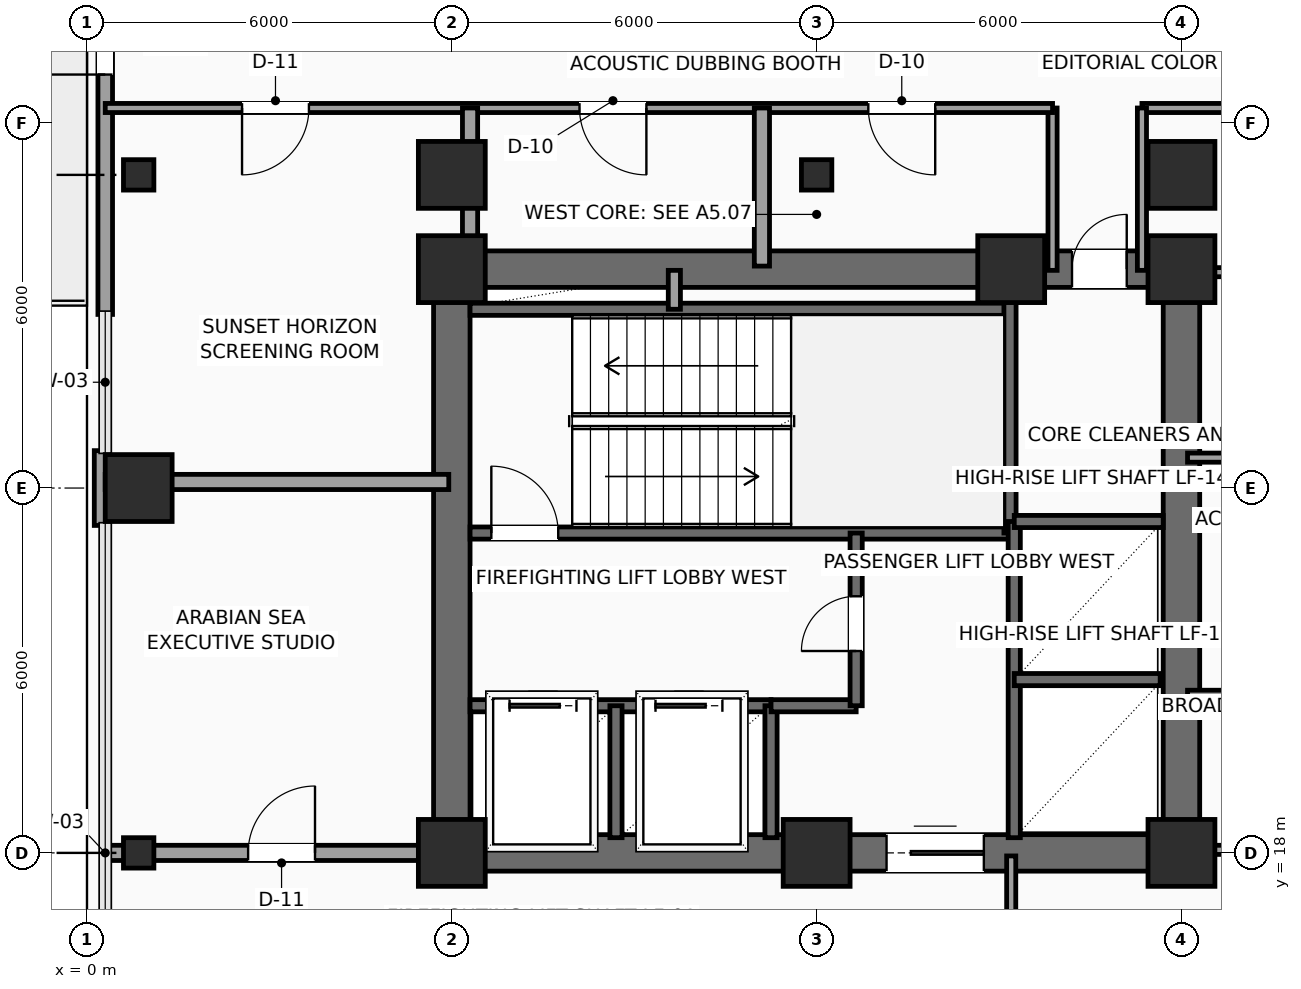
"""IFC4 building model, lengths in metres.
Left out: names, types, materials, properties, quantities, classifications, styles, units other than length and angle.
Written with IfcOpenShell. Run it as: python <this file> out.ifc"""

import sys

from ifc_helpers import new_model, si_unit, direction, frame, frame_2d, origin, origin_2d, place, context, subcontext, project, spatial, rectangle, hollow_rectangle, extrude, element, fill, save


model = new_model("IFC4")
c1 = context("Model", 3, precision=1e-05, world=origin(), true_north=direction((0.0, 1.0)))
c2 = subcontext(c1, "Body", "Model", "MODEL_VIEW")
j1 = project(units=[si_unit("LENGTHUNIT", "METRE"), si_unit("PLANEANGLEUNIT", "RADIAN")], contexts=[c1])
p1 = place(None, origin())
s1 = spatial("IfcSite", under=j1, at=p1, CompositionType="ELEMENT")
p2 = place(p1, origin())
s2 = spatial("IfcBuilding", under=s1, at=p2, CompositionType="ELEMENT")
p3 = place(p2, frame((0.0, 0.0, 134.4)))
s3 = spatial("IfcBuildingStorey", under=s2, at=p3, CompositionType="ELEMENT", Elevation=134.4)
for number, where, z_axis, x_axis in (
    (1, (6.0, 18.0, 0.0), (0.0, 0.0, 1.0), (1.0, 0.0, 0.0)),
    (2, (12.0, 18.0, 0.0), (0.0, 0.0, 1.0), (1.0, 0.0, 0.0)),
    (3, (18.0, 18.0, 0.0), (0.0, 0.0, 1.0), (1.0, 0.0, 0.0)),
    (4, (6.0, 27.6, 0.0), (0.0, 0.0, 1.0), (1.0, 0.0, 0.0)),
    (5, (15.2, 27.6, 0.0), (0.0, 0.0, 1.0), (1.0, 0.0, 0.0)),
    (6, (18.0, 27.6, 0.0), (0.0, 0.0, 1.0), (1.0, 0.0, 0.0)),
):
    element("IfcColumn", number, at=place(p3, frame(where, z_axis=z_axis, x_axis=x_axis)), inside=s3, PredefinedType="COLUMN", context=c2, shape_type="SweptSolid", body=[
        extrude(rectangle(XDim=1.1, YDim=1.1, at=origin_2d()), origin(), (0.0, 0.0, 1.0), 3.75),
    ])
p4 = place(p3, frame((0.85, 18.0, 0.0), z_axis=(0.0, 0.0, 1.0), x_axis=(1.0, 0.0, 0.0)))
e7 = element("IfcColumn", 7, at=p4, inside=s3, PredefinedType="COLUMN", context=c2, shape_type="SweptSolid", body=[
    extrude(hollow_rectangle(XDim=0.5, YDim=0.5, WallThickness=0.025, InnerFilletRadius=0.025, OuterFilletRadius=0.04, at=origin_2d()), origin(), (0.0, 0.0, 1.0), 3.75),
])
p5 = place(p3, frame((0.85, 24.0, 0.0), z_axis=(0.0, 0.0, 1.0), x_axis=(1.0, 0.0, 0.0)))
e8 = element("IfcColumn", 8, at=p5, inside=s3, PredefinedType="COLUMN", context=c2, shape_type="SweptSolid", body=[
    extrude(rectangle(XDim=1.1, YDim=1.1, at=origin_2d()), origin(), (0.0, 0.0, 1.0), 3.75),
])
p6 = place(p3, frame((0.85, 29.15, 0.0), z_axis=(0.0, 0.0, 1.0), x_axis=(1.0, 0.0, 0.0)))
e9 = element("IfcColumn", 9, at=p6, inside=s3, PredefinedType="COLUMN", context=c2, shape_type="SweptSolid", body=[
    extrude(hollow_rectangle(XDim=0.5, YDim=0.5, WallThickness=0.025, InnerFilletRadius=0.025, OuterFilletRadius=0.04, at=origin_2d()), origin(), (0.0, 0.0, 1.0), 3.75),
])
p7 = place(p3, frame((6.0, 29.15, 0.0), z_axis=(0.0, 0.0, 1.0), x_axis=(1.0, 0.0, 0.0)))
e10 = element("IfcColumn", 10, at=p7, inside=s3, PredefinedType="COLUMN", context=c2, shape_type="SweptSolid", body=[
    extrude(rectangle(XDim=1.1, YDim=1.1, at=origin_2d()), origin(), (0.0, 0.0, 1.0), 3.75),
])
p8 = place(p3, frame((12.0, 29.15, 0.0), z_axis=(0.0, 0.0, 1.0), x_axis=(1.0, 0.0, 0.0)))
e11 = element("IfcColumn", 11, at=p8, inside=s3, PredefinedType="COLUMN", context=c2, shape_type="SweptSolid", body=[
    extrude(hollow_rectangle(XDim=0.5, YDim=0.5, WallThickness=0.025, InnerFilletRadius=0.025, OuterFilletRadius=0.04, at=origin_2d()), origin(), (0.0, 0.0, 1.0), 3.75),
])
p9 = place(p3, frame((18.0, 29.15, 0.0), z_axis=(0.0, 0.0, 1.0), x_axis=(1.0, 0.0, 0.0)))
e12 = element("IfcColumn", 12, at=p9, inside=s3, PredefinedType="COLUMN", context=c2, shape_type="SweptSolid", body=[
    extrude(rectangle(XDim=1.1, YDim=1.1, at=origin_2d()), origin(), (0.0, 0.0, 1.0), 3.75),
])
p10 = place(p3, frame((0.3, 26.855, 0.0), z_axis=(0.0, 0.0, 1.0), x_axis=(0.0, 1.0, 0.0)))
e13 = element("IfcWall", 13, at=p10, inside=s3, PredefinedType="SOLIDWALL", context=c2, shape_type="SweptSolid", body=[
    extrude(rectangle(XDim=9.29, YDim=0.24, at=frame_2d((4.645, 0.0))), origin(), (0.0, 0.0, 1.0), 3.525),
])
p11 = place(p10, frame((3.945, 0.0, 0.0)))
e14 = element("IfcOpeningElement", 14, at=p11, cuts=e13, PredefinedType="OPENING", context=c2, shape_type="SweptSolid", body=[
    extrude(rectangle(XDim=1.05, YDim=2.2, at=frame_2d((0.525, 1.1))), frame((0.0, 0.13, 0.0), z_axis=(0.0, -1.0, 0.0), x_axis=(1.0, 0.0, 0.0)), (0.0, 0.0, 1.0), 0.26),
])
p12 = place(p3, frame((0.24, 23.385, 0.0), z_axis=(0.0, 0.0, 1.0), x_axis=(0.0, 1.0, 0.0)))
e15 = element("IfcWall", 15, at=p12, inside=s3, PredefinedType="SOLIDWALL", context=c2, shape_type="SweptSolid", body=[
    extrude(rectangle(XDim=1.23, YDim=0.24, at=frame_2d((0.615, 0.0))), origin(), (0.0, 0.0, 1.0), 3.525),
])
p13 = place(p3, frame((6.0, 18.0, 0.0), z_axis=(0.0, 0.0, 1.0), x_axis=(1.0, 0.0, 0.0)))
e16 = element("IfcWall", 16, at=p13, inside=s3, PredefinedType="SHEAR", context=c2, shape_type="SweptSolid", body=[
    extrude(rectangle(XDim=12.0, YDim=0.6, at=frame_2d((6.0, 0.0))), origin(), (0.0, 0.0, 1.0), 3.525),
])
p14 = place(p13, frame((7.15, 0.0, 0.0)))
e17 = element("IfcOpeningElement", 17, at=p14, cuts=e16, PredefinedType="OPENING", context=c2, shape_type="SweptSolid", body=[
    extrude(rectangle(XDim=1.6, YDim=2.3, at=frame_2d((0.8, 1.15))), frame((0.0, 0.31, 0.0), z_axis=(0.0, -1.0, 0.0), x_axis=(1.0, 0.0, 0.0)), (0.0, 0.0, 1.0), 0.62),
])
p15 = place(p3, frame((6.0, 27.6, 0.0), z_axis=(0.0, 0.0, 1.0), x_axis=(1.0, 0.0, 0.0)))
e18 = element("IfcWall", 18, at=p15, inside=s3, PredefinedType="SHEAR", context=c2, shape_type="SweptSolid", body=[
    extrude(rectangle(XDim=12.0, YDim=0.6, at=frame_2d((6.0, 0.0))), origin(), (0.0, 0.0, 1.0), 3.525),
])
p16 = place(p15, frame((10.2, 0.0, 0.0)))
e19 = element("IfcOpeningElement", 19, at=p16, cuts=e18, PredefinedType="OPENING", context=c2, shape_type="SweptSolid", body=[
    extrude(rectangle(XDim=0.9, YDim=2.15, at=frame_2d((0.45, 1.075))), frame((0.0, 0.31, 0.0), z_axis=(0.0, -1.0, 0.0), x_axis=(1.0, 0.0, 0.0)), (0.0, 0.0, 1.0), 0.62),
])
for number, where, z_axis, x_axis in (
    (20, (6.0, 18.0, 0.0), (0.0, 0.0, 1.0), (0.0, 1.0, 0.0)),
    (21, (18.0, 18.0, 0.0), (0.0, 0.0, 1.0), (0.0, 1.0, 0.0)),
):
    element("IfcWall", number, at=place(p3, frame(where, z_axis=z_axis, x_axis=x_axis)), inside=s3, PredefinedType="SHEAR", context=c2, shape_type="SweptSolid", body=[
        extrude(rectangle(XDim=9.6, YDim=0.6, at=frame_2d((4.8, 0.0))), origin(), (0.0, 0.0, 1.0), 3.525),
    ])
p17 = place(p3, frame((6.3, 23.26, 0.0), z_axis=(0.0, 0.0, 1.0), x_axis=(1.0, 0.0, 0.0)))
e22 = element("IfcWall", 22, at=p17, inside=s3, PredefinedType="SHEAR", context=c2, shape_type="SweptSolid", body=[
    extrude(rectangle(XDim=8.88, YDim=0.2, at=frame_2d((4.44, 0.0))), origin(), (0.0, 0.0, 1.0), 3.525),
])
p18 = place(p17, frame((0.35, 0.0, 0.0)))
e23 = element("IfcOpeningElement", 23, at=p18, cuts=e22, PredefinedType="OPENING", context=c2, shape_type="SweptSolid", body=[
    extrude(rectangle(XDim=1.1, YDim=2.2, at=frame_2d((0.55, 1.1))), frame((0.0, 0.11, 0.0), z_axis=(0.0, -1.0, 0.0), x_axis=(1.0, 0.0, 0.0)), (0.0, 0.0, 1.0), 0.22),
])
p19 = place(p3, frame((6.3, 26.94, 0.0), z_axis=(0.0, 0.0, 1.0), x_axis=(1.0, 0.0, 0.0)))
e24 = element("IfcWall", 24, at=p19, inside=s3, PredefinedType="SHEAR", context=c2, shape_type="SweptSolid", body=[
    extrude(rectangle(XDim=8.88, YDim=0.2, at=frame_2d((4.44, 0.0))), origin(), (0.0, 0.0, 1.0), 3.525),
])
p20 = place(p3, frame((15.18, 23.26, 0.0), z_axis=(0.0, 0.0, 1.0), x_axis=(0.0, 1.0, 0.0)))
e25 = element("IfcWall", 25, at=p20, inside=s3, PredefinedType="SHEAR", context=c2, shape_type="SweptSolid", body=[
    extrude(rectangle(XDim=4.04, YDim=0.2, at=frame_2d((2.02, 0.0))), origin(), (0.0, 0.0, 1.0), 3.525),
])
p21 = place(p3, frame((6.3, 20.42, 0.0), z_axis=(0.0, 0.0, 1.0), x_axis=(1.0, 0.0, 0.0)))
e26 = element("IfcWall", 26, at=p21, inside=s3, PredefinedType="SHEAR", context=c2, shape_type="SweptSolid", body=[
    extrude(rectangle(XDim=4.95, YDim=0.2, at=frame_2d((2.475, 0.0))), origin(), (0.0, 0.0, 1.0), 3.525),
])
p22 = place(p21, frame((0.65, 0.0, 0.0)))
e27 = element("IfcOpeningElement", 27, at=p22, cuts=e26, PredefinedType="OPENING", context=c2, shape_type="SweptSolid", body=[
    extrude(rectangle(XDim=1.1, YDim=2.2, at=frame_2d((0.55, 1.1))), frame((0.0, 0.11, 0.0), z_axis=(0.0, -1.0, 0.0), x_axis=(1.0, 0.0, 0.0)), (0.0, 0.0, 1.0), 0.22),
])
p23 = place(p21, frame((3.05, 0.0, 0.0)))
e28 = element("IfcOpeningElement", 28, at=p23, cuts=e26, PredefinedType="OPENING", context=c2, shape_type="SweptSolid", body=[
    extrude(rectangle(XDim=1.1, YDim=2.2, at=frame_2d((0.55, 1.1))), frame((0.0, 0.11, 0.0), z_axis=(0.0, -1.0, 0.0), x_axis=(1.0, 0.0, 0.0)), (0.0, 0.0, 1.0), 0.22),
])
for number, where, z_axis, x_axis in (
    (29, (8.7, 18.25, 0.0), (0.0, 0.0, 1.0), (0.0, 1.0, 0.0)),
    (30, (11.25, 18.25, 0.0), (0.0, 0.0, 1.0), (0.0, 1.0, 0.0)),
):
    element("IfcWall", number, at=place(p3, frame(where, z_axis=z_axis, x_axis=x_axis)), inside=s3, PredefinedType="SHEAR", context=c2, shape_type="SweptSolid", body=[
        extrude(rectangle(XDim=2.17, YDim=0.2, at=frame_2d((1.085, 0.0))), origin(), (0.0, 0.0, 1.0), 3.525),
    ])
p24 = place(p3, frame((11.25, 20.42, 0.0), z_axis=(0.0, 0.0, 1.0), x_axis=(1.0, 0.0, 0.0)))
e31 = element("IfcWall", 31, at=p24, inside=s3, PredefinedType="SHEAR", context=c2, shape_type="SweptSolid", body=[
    extrude(rectangle(XDim=1.4, YDim=0.2, at=frame_2d((0.7, 0.0))), origin(), (0.0, 0.0, 1.0), 3.525),
])
p25 = place(p3, frame((12.65, 20.42, 0.0), z_axis=(0.0, 0.0, 1.0), x_axis=(0.0, 1.0, 0.0)))
e32 = element("IfcWall", 32, at=p25, inside=s3, PredefinedType="SHEAR", context=c2, shape_type="SweptSolid", body=[
    extrude(rectangle(XDim=2.84, YDim=0.2, at=frame_2d((1.42, 0.0))), origin(), (0.0, 0.0, 1.0), 3.525),
])
p26 = place(p25, frame((0.9, 0.0, 0.0)))
e33 = element("IfcOpeningElement", 33, at=p26, cuts=e32, PredefinedType="OPENING", context=c2, shape_type="SweptSolid", body=[
    extrude(rectangle(XDim=0.9, YDim=2.15, at=frame_2d((0.45, 1.075))), frame((0.0, 0.11, 0.0), z_axis=(0.0, -1.0, 0.0), x_axis=(1.0, 0.0, 0.0)), (0.0, 0.0, 1.0), 0.22),
])
p27 = place(p3, frame((9.66, 26.94, 0.0), z_axis=(0.0, 0.0, 1.0), x_axis=(0.0, 1.0, 0.0)))
e34 = element("IfcWall", 34, at=p27, inside=s3, PredefinedType="SOLIDWALL", context=c2, shape_type="SweptSolid", body=[
    extrude(rectangle(XDim=0.64, YDim=0.2, at=frame_2d((0.32, 0.0))), origin(), (0.0, 0.0, 1.0), 3.525),
])
p28 = place(p3, frame((15.25, 18.25, 0.0), z_axis=(0.0, 0.0, 1.0), x_axis=(0.0, 1.0, 0.0)))
e35 = element("IfcWall", 35, at=p28, inside=s3, PredefinedType="SHEAR", context=c2, shape_type="SweptSolid", body=[
    extrude(rectangle(XDim=5.2, YDim=0.2, at=frame_2d((2.6, 0.0))), origin(), (0.0, 0.0, 1.0), 3.525),
])
p29 = place(p3, frame((15.25, 20.85, 0.0), z_axis=(0.0, 0.0, 1.0), x_axis=(1.0, 0.0, 0.0)))
e36 = element("IfcWall", 36, at=p29, inside=s3, PredefinedType="SHEAR", context=c2, shape_type="SweptSolid", body=[
    extrude(rectangle(XDim=2.4, YDim=0.2, at=frame_2d((1.2, 0.0))), origin(), (0.0, 0.0, 1.0), 3.525),
])
p30 = place(p3, frame((15.25, 23.45, 0.0), z_axis=(0.0, 0.0, 1.0), x_axis=(1.0, 0.0, 0.0)))
e37 = element("IfcWall", 37, at=p30, inside=s3, PredefinedType="SHEAR", context=c2, shape_type="SweptSolid", body=[
    extrude(rectangle(XDim=2.45, YDim=0.2, at=frame_2d((1.225, 0.0))), origin(), (0.0, 0.0, 1.0), 3.525),
])
p31 = place(p3, frame((15.2, 17.95, 0.0), z_axis=(0.0, 0.0, 1.0), x_axis=(0.0, -1.0, 0.0)))
e38 = element("IfcWall", 38, at=p31, inside=s3, PredefinedType="PARTITIONING", context=c2, shape_type="SweptSolid", body=[
    extrude(rectangle(XDim=2.4, YDim=0.15, at=frame_2d((1.2, 0.0))), origin(), (0.0, 0.0, 1.0), 3.525),
])
p32 = place(p3, frame((21.35, 30.25, 0.0), z_axis=(0.0, 0.0, 1.0), x_axis=(-1.0, 0.0, 0.0)))
e39 = element("IfcWall", 39, at=p32, inside=s3, PredefinedType="PARTITIONING", context=c2, shape_type="SweptSolid", body=[
    extrude(rectangle(XDim=4.0, YDim=0.15, at=frame_2d((2.0, 0.0))), origin(), (0.0, 0.0, 1.0), 3.525),
])
p33 = place(p32, frame((1.48, 0.0, 0.0)))
e40 = element("IfcOpeningElement", 40, at=p33, cuts=e39, PredefinedType="OPENING", context=c2, shape_type="SweptSolid", body=[
    extrude(rectangle(XDim=1.1, YDim=2.25, at=frame_2d((0.55, 1.125))), frame((0.0, 0.085, 0.0), z_axis=(0.0, -1.0, 0.0), x_axis=(1.0, 0.0, 0.0)), (0.0, 0.0, 1.0), 0.17),
])
for number, where, z_axis, x_axis in (
    (41, (17.35, 30.25, 0.0), (0.0, 0.0, 1.0), (0.0, -1.0, 0.0)),
    (42, (15.88, 27.58, 0.0), (0.0, 0.0, 1.0), (0.0, 1.0, 0.0)),
):
    element("IfcWall", number, at=place(p3, frame(where, z_axis=z_axis, x_axis=x_axis)), inside=s3, PredefinedType="PARTITIONING", context=c2, shape_type="SweptSolid", body=[
        extrude(rectangle(XDim=2.67, YDim=0.15, at=frame_2d((1.335, 0.0))), origin(), (0.0, 0.0, 1.0), 3.525),
    ])
p34 = place(p3, frame((15.88, 30.25, 0.0), z_axis=(0.0, 0.0, 1.0), x_axis=(-1.0, 0.0, 0.0)))
e43 = element("IfcWall", 43, at=p34, inside=s3, PredefinedType="PARTITIONING", context=c2, shape_type="SweptSolid", body=[
    extrude(rectangle(XDim=15.58, YDim=0.15, at=frame_2d((7.79, 0.0))), origin(), (0.0, 0.0, 1.0), 3.525),
])
p35 = place(p34, frame((12.23, 0.0, 0.0)))
e44 = element("IfcOpeningElement", 44, at=p35, cuts=e43, PredefinedType="OPENING", context=c2, shape_type="SweptSolid", body=[
    extrude(rectangle(XDim=1.1, YDim=2.25, at=frame_2d((0.55, 1.125))), frame((0.0, 0.085, 0.0), z_axis=(0.0, -1.0, 0.0), x_axis=(1.0, 0.0, 0.0)), (0.0, 0.0, 1.0), 0.17),
])
p36 = place(p34, frame((6.68, 0.0, 0.0)))
e45 = element("IfcOpeningElement", 45, at=p36, cuts=e43, PredefinedType="OPENING", context=c2, shape_type="SweptSolid", body=[
    extrude(rectangle(XDim=1.1, YDim=2.25, at=frame_2d((0.55, 1.125))), frame((0.0, 0.085, 0.0), z_axis=(0.0, -1.0, 0.0), x_axis=(1.0, 0.0, 0.0)), (0.0, 0.0, 1.0), 0.17),
])
p37 = place(p34, frame((1.93, 0.0, 0.0)))
e46 = element("IfcOpeningElement", 46, at=p37, cuts=e43, PredefinedType="OPENING", context=c2, shape_type="SweptSolid", body=[
    extrude(rectangle(XDim=1.1, YDim=2.25, at=frame_2d((0.55, 1.125))), frame((0.0, 0.085, 0.0), z_axis=(0.0, -1.0, 0.0), x_axis=(1.0, 0.0, 0.0)), (0.0, 0.0, 1.0), 0.17),
])
p38 = place(p3, frame((18.1, 18.05, 0.0), z_axis=(0.0, 0.0, 1.0), x_axis=(1.0, 0.0, 0.0)))
e47 = element("IfcWall", 47, at=p38, inside=s3, PredefinedType="PARTITIONING", context=c2, shape_type="SweptSolid", body=[
    extrude(rectangle(XDim=3.25, YDim=0.15, at=frame_2d((1.625, 0.0))), origin(), (0.0, 0.0, 1.0), 3.017),
])
for number, where, z_axis, x_axis in (
    (48, (18.1, 20.6, 0.0), (0.0, 0.0, 1.0), (1.0, 0.0, 0.0)),
    (49, (18.1, 24.5, 0.0), (0.0, 0.0, 1.0), (1.0, 0.0, 0.0)),
    (50, (18.1, 27.55, 0.0), (0.0, 0.0, 1.0), (1.0, 0.0, 0.0)),
):
    element("IfcWall", number, at=place(p3, frame(where, z_axis=z_axis, x_axis=x_axis)), inside=s3, PredefinedType="PARTITIONING", context=c2, shape_type="SweptSolid", body=[
        extrude(rectangle(XDim=3.25, YDim=0.15, at=frame_2d((1.625, 0.0))), origin(), (0.0, 0.0, 1.0), 3.525),
    ])
p39 = place(p3, frame((0.3, 18.0, 0.0), z_axis=(0.0, 0.0, 1.0), x_axis=(1.0, 0.0, 0.0)))
e51 = element("IfcWall", 51, at=p39, inside=s3, PredefinedType="PARTITIONING", context=c2, shape_type="SweptSolid", body=[
    extrude(rectangle(XDim=5.65, YDim=0.25, at=frame_2d((2.825, 0.0))), origin(), (0.0, 0.0, 1.0), 3.017),
])
p40 = place(p39, frame((2.35, 0.0, 0.0)))
e52 = element("IfcOpeningElement", 52, at=p40, cuts=e51, PredefinedType="OPENING", context=c2, shape_type="SweptSolid", body=[
    extrude(rectangle(XDim=1.1, YDim=2.25, at=frame_2d((0.55, 1.125))), frame((0.0, 0.135, 0.0), z_axis=(0.0, -1.0, 0.0), x_axis=(1.0, 0.0, 0.0)), (0.0, 0.0, 1.0), 0.27),
])
p41 = place(p3, frame((0.3, 24.1, 0.0), z_axis=(0.0, 0.0, 1.0), x_axis=(1.0, 0.0, 0.0)))
e53 = element("IfcWall", 53, at=p41, inside=s3, PredefinedType="PARTITIONING", context=c2, shape_type="SweptSolid", body=[
    extrude(rectangle(XDim=5.65, YDim=0.25, at=frame_2d((2.825, 0.0))), origin(), (0.0, 0.0, 1.0), 3.525),
])
p42 = place(p3, frame((6.3, 27.65, 0.0), z_axis=(0.0, 0.0, 1.0), x_axis=(0.0, 1.0, 0.0)))
e54 = element("IfcWall", 54, at=p42, inside=s3, PredefinedType="PARTITIONING", context=c2, shape_type="SweptSolid", body=[
    extrude(rectangle(XDim=2.6, YDim=0.25, at=frame_2d((1.3, 0.0))), origin(), (0.0, 0.0, 1.0), 3.017),
])
p43 = place(p3, frame((11.1, 27.65, 0.0), z_axis=(0.0, 0.0, 1.0), x_axis=(0.0, 1.0, 0.0)))
e55 = element("IfcWall", 55, at=p43, inside=s3, PredefinedType="PARTITIONING", context=c2, shape_type="SweptSolid", body=[
    extrude(rectangle(XDim=2.6, YDim=0.25, at=frame_2d((1.3, 0.0))), origin(), (0.0, 0.0, 1.0), 3.525),
])
p44 = place(p11, origin())
e56 = element("IfcDoor", 56, at=p44, inside=s3, OperationType="SINGLE_SWING_LEFT", PredefinedType="DOOR", context=c2, shape_type="SweptSolid", body=[
    extrude(rectangle(XDim=1.05, YDim=2.2, at=frame_2d((0.525, 1.1))), frame((0.0, 0.025, 0.0), z_axis=(0.0, -1.0, 0.0), x_axis=(1.0, 0.0, 0.0)), (0.0, 0.0, 1.0), 0.05),
])
fill(e14, e56)
p45 = place(p14, origin())
e57 = element("IfcDoor", 57, at=p45, inside=s3, OperationType="DOUBLE_DOOR_SLIDING", PredefinedType="DOOR", context=c2, shape_type="SweptSolid", body=[
    extrude(rectangle(XDim=1.6, YDim=2.3, at=frame_2d((0.8, 1.15))), frame((0.0, 0.025, 0.0), z_axis=(0.0, -1.0, 0.0), x_axis=(1.0, 0.0, 0.0)), (0.0, 0.0, 1.0), 0.05),
])
fill(e17, e57)
p46 = place(p16, origin())
e58 = element("IfcDoor", 58, at=p46, inside=s3, OperationType="SINGLE_SWING_RIGHT", PredefinedType="DOOR", context=c2, shape_type="SweptSolid", body=[
    extrude(rectangle(XDim=0.9, YDim=2.15, at=frame_2d((0.45, 1.075))), frame((0.0, 0.025, 0.0), z_axis=(0.0, -1.0, 0.0), x_axis=(1.0, 0.0, 0.0)), (0.0, 0.0, 1.0), 0.05),
])
fill(e19, e58)
p47 = place(p18, origin())
e59 = element("IfcDoor", 59, at=p47, inside=s3, OperationType="SINGLE_SWING_LEFT", PredefinedType="DOOR", context=c2, shape_type="SweptSolid", body=[
    extrude(rectangle(XDim=1.1, YDim=2.2, at=frame_2d((0.55, 1.1))), frame((0.0, 0.025, 0.0), z_axis=(0.0, -1.0, 0.0), x_axis=(1.0, 0.0, 0.0)), (0.0, 0.0, 1.0), 0.05),
])
fill(e23, e59)
p48 = place(p22, origin())
e60 = element("IfcDoor", 60, at=p48, inside=s3, OperationType="SLIDING_TO_LEFT", PredefinedType="DOOR", context=c2, shape_type="SweptSolid", body=[
    extrude(rectangle(XDim=1.1, YDim=2.2, at=frame_2d((0.55, 1.1))), frame((0.0, 0.025, 0.0), z_axis=(0.0, -1.0, 0.0), x_axis=(1.0, 0.0, 0.0)), (0.0, 0.0, 1.0), 0.05),
])
fill(e27, e60)
p49 = place(p23, origin())
e61 = element("IfcDoor", 61, at=p49, inside=s3, OperationType="SLIDING_TO_LEFT", PredefinedType="DOOR", context=c2, shape_type="SweptSolid", body=[
    extrude(rectangle(XDim=1.1, YDim=2.2, at=frame_2d((0.55, 1.1))), frame((0.0, 0.025, 0.0), z_axis=(0.0, -1.0, 0.0), x_axis=(1.0, 0.0, 0.0)), (0.0, 0.0, 1.0), 0.05),
])
fill(e28, e61)
p50 = place(p26, origin())
e62 = element("IfcDoor", 62, at=p50, inside=s3, OperationType="SINGLE_SWING_LEFT", PredefinedType="DOOR", context=c2, shape_type="SweptSolid", body=[
    extrude(rectangle(XDim=0.9, YDim=2.15, at=frame_2d((0.45, 1.075))), frame((0.0, 0.025, 0.0), z_axis=(0.0, -1.0, 0.0), x_axis=(1.0, 0.0, 0.0)), (0.0, 0.0, 1.0), 0.05),
])
fill(e33, e62)
p51 = place(p35, origin())
e63 = element("IfcDoor", 63, at=p51, inside=s3, OperationType="SINGLE_SWING_RIGHT", PredefinedType="DOOR", context=c2, shape_type="SweptSolid", body=[
    extrude(rectangle(XDim=1.1, YDim=2.25, at=frame_2d((0.55, 1.125))), frame((0.0, 0.025, 0.0), z_axis=(0.0, -1.0, 0.0), x_axis=(1.0, 0.0, 0.0)), (0.0, 0.0, 1.0), 0.05),
])
fill(e44, e63)
p52 = place(p36, origin())
e64 = element("IfcDoor", 64, at=p52, inside=s3, OperationType="SINGLE_SWING_LEFT", PredefinedType="DOOR", context=c2, shape_type="SweptSolid", body=[
    extrude(rectangle(XDim=1.1, YDim=2.25, at=frame_2d((0.55, 1.125))), frame((0.0, 0.025, 0.0), z_axis=(0.0, -1.0, 0.0), x_axis=(1.0, 0.0, 0.0)), (0.0, 0.0, 1.0), 0.05),
])
fill(e45, e64)
p53 = place(p37, origin())
e65 = element("IfcDoor", 65, at=p53, inside=s3, OperationType="SINGLE_SWING_LEFT", PredefinedType="DOOR", context=c2, shape_type="SweptSolid", body=[
    extrude(rectangle(XDim=1.1, YDim=2.25, at=frame_2d((0.55, 1.125))), frame((0.0, 0.025, 0.0), z_axis=(0.0, -1.0, 0.0), x_axis=(1.0, 0.0, 0.0)), (0.0, 0.0, 1.0), 0.05),
])
fill(e46, e65)
p54 = place(p40, origin())
e66 = element("IfcDoor", 66, at=p54, inside=s3, OperationType="SINGLE_SWING_RIGHT", PredefinedType="DOOR", context=c2, shape_type="SweptSolid", body=[
    extrude(rectangle(XDim=1.1, YDim=2.25, at=frame_2d((0.55, 1.125))), frame((0.0, 0.025, 0.0), z_axis=(0.0, -1.0, 0.0), x_axis=(1.0, 0.0, 0.0)), (0.0, 0.0, 1.0), 0.05),
])
fill(e52, e66)
save(model, sys.argv[1])
